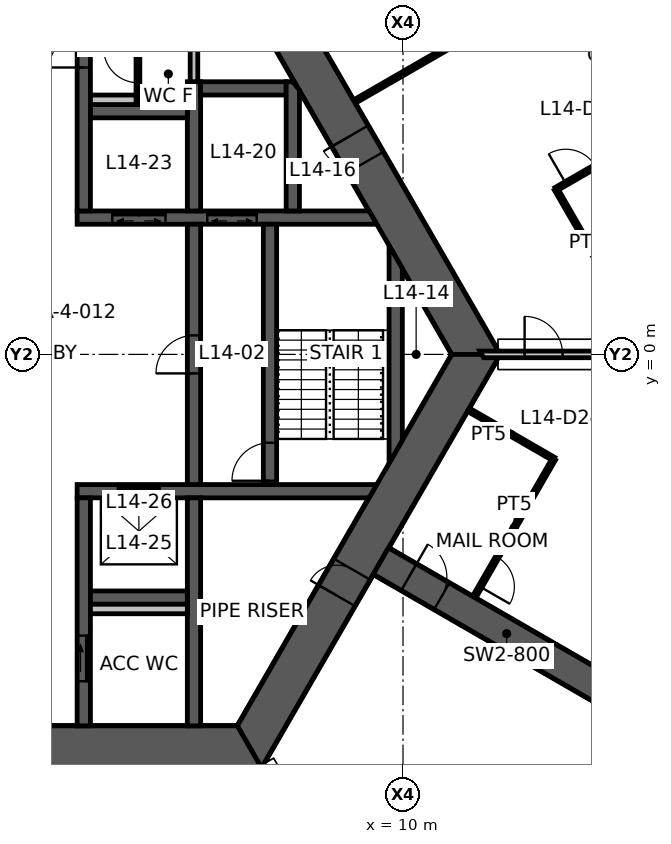
"""IFC4 building model, lengths in metres.
Left out: names, types, materials, properties, quantities, classifications, styles, units other than length and angle.
Written with IfcOpenShell. Run it as: python <this file> out.ifc"""

import sys

from ifc_helpers import new_model, si_unit, direction, frame, frame_2d, origin, place, context, subcontext, project, spatial, polyline, rectangle, outline, extrude, element, fill, save


model = new_model("IFC4")
c1 = context("Model", 3, precision=1e-05, world=origin(), true_north=direction((0.0, 1.0)))
c2 = subcontext(c1, "Body", "Model", "MODEL_VIEW")
j1 = project(units=[si_unit("LENGTHUNIT", "METRE"), si_unit("PLANEANGLEUNIT", "RADIAN")], contexts=[c1])
p1 = place(None, origin())
s1 = spatial("IfcSite", under=j1, at=p1, CompositionType="ELEMENT")
p2 = place(p1, origin())
s2 = spatial("IfcBuilding", under=s1, at=p2, CompositionType="ELEMENT")
p3 = place(p2, frame((0.0, 0.0, 57.0)))
s3 = spatial("IfcBuildingStorey", under=s2, at=p3, CompositionType="ELEMENT", Elevation=57.0)
p4 = place(p3, frame((11.922, 0.0, 0.0), z_axis=(0.0, 0.0, 1.0), x_axis=(-0.500004296715, 0.866022923061, 0.0)))
e1 = element("IfcWall", 1, at=p4, inside=s3, PredefinedType="SHEAR", context=c2, shape_type="SweptSolid", body=[
    extrude(outline(polyline([(-0.318, -0.55), (5.835, -0.55), (6.635, -0.55), (12.24, -0.55), (11.605, 0.55), (6.635, 0.55), (5.835, 0.55), (0.318, 0.55), (-0.318, -0.55)])), origin(), (0.0, 0.0, 1.0), 4.2),
])
p5 = place(p4, frame((5.835, 0.0, 0.0)))
e2 = element("IfcOpeningElement", 2, at=p5, cuts=e1, PredefinedType="OPENING", context=c2, shape_type="SweptSolid", body=[
    extrude(rectangle(XDim=0.8, YDim=2.1, at=frame_2d((0.4, 1.05))), frame((0.0, 0.56, 0.0), z_axis=(0.0, -1.0, 0.0), x_axis=(1.0, 0.0, 0.0)), (0.0, 0.0, 1.0), 1.12),
])
p6 = place(p3, frame((-5.961, -10.325, 0.0), z_axis=(0.0, 0.0, 1.0), x_axis=(1.0, 0.0, 0.0)))
e3 = element("IfcWall", 3, at=p6, inside=s3, PredefinedType="SHEAR", context=c2, shape_type="SweptSolid", body=[
    extrude(outline(polyline([(-0.318, -0.55), (5.461, -0.55), (6.461, -0.55), (12.24, -0.55), (11.605, 0.55), (6.461, 0.55), (5.461, 0.55), (0.318, 0.55), (-0.318, -0.55)])), origin(), (0.0, 0.0, 1.0), 4.2),
])
p7 = place(p6, frame((5.461, 0.0, 0.0)))
e4 = element("IfcOpeningElement", 4, at=p7, cuts=e3, PredefinedType="OPENING", context=c2, shape_type="SweptSolid", body=[
    extrude(rectangle(XDim=1.0, YDim=2.1, at=frame_2d((0.5, 1.05))), frame((0.0, 0.56, 0.0), z_axis=(0.0, -1.0, 0.0), x_axis=(1.0, 0.0, 0.0)), (0.0, 0.0, 1.0), 1.12),
])
p8 = place(p3, frame((5.961, -10.325, 0.0), z_axis=(0.0, 0.0, 1.0), x_axis=(0.500004296715, 0.866022923061, 0.0)))
e5 = element("IfcWall", 5, at=p8, inside=s3, PredefinedType="SHEAR", context=c2, shape_type="SweptSolid", body=[
    extrude(outline(polyline([(-0.318, -0.55), (4.594, -0.55), (5.394, -0.55), (12.24, -0.55), (11.605, 0.55), (5.394, 0.55), (4.594, 0.55), (0.318, 0.55), (-0.318, -0.55)])), origin(), (0.0, 0.0, 1.0), 4.2),
])
p9 = place(p8, frame((4.594, 0.0, 0.0)))
e6 = element("IfcOpeningElement", 6, at=p9, cuts=e5, PredefinedType="OPENING", context=c2, shape_type="SweptSolid", body=[
    extrude(rectangle(XDim=0.8, YDim=2.1, at=frame_2d((0.4, 1.05))), frame((0.0, 0.56, 0.0), z_axis=(0.0, -1.0, 0.0), x_axis=(1.0, 0.0, 0.0)), (0.0, 0.0, 1.0), 1.12),
])
p10 = place(p3, frame((9.418, -5.438, 0.0), z_axis=(0.0, 0.0, 1.0), x_axis=(0.866029782078, -0.499992416496, 0.0)))
e7 = element("IfcWall", 7, at=p10, inside=s3, PredefinedType="SHEAR", context=c2, shape_type="SweptSolid", body=[
    extrude(rectangle(XDim=7.646, YDim=0.8, at=frame_2d((3.823, 0.0))), origin(), (0.0, 0.0, 1.0), 4.2),
])
p11 = place(p10, frame((0.85, 0.0, 0.0)))
e8 = element("IfcOpeningElement", 8, at=p11, cuts=e7, PredefinedType="OPENING", context=c2, shape_type="SweptSolid", body=[
    extrude(rectangle(XDim=1.0, YDim=2.1, at=frame_2d((0.5, 1.05))), frame((0.0, 0.41, 0.0), z_axis=(0.0, -1.0, 0.0), x_axis=(1.0, 0.0, 0.0)), (0.0, 0.0, 1.0), 0.82),
])
p12 = place(p3, frame((1.425, 3.6, 0.0), z_axis=(0.0, 0.0, 1.0), x_axis=(1.0, 0.0, 0.0)))
e9 = element("IfcWall", 9, at=p12, inside=s3, PredefinedType="SHEAR", context=c2, shape_type="SweptSolid", body=[
    extrude(outline(polyline([(0.0, -0.175), (0.925, -0.175), (2.325, -0.175), (3.425, -0.175), (4.725, -0.175), (7.885, -0.175), (7.683, 0.175), (4.725, 0.175), (3.425, 0.175), (2.325, 0.175), (0.925, 0.175), (0.0, 0.175), (0.0, -0.175)])), origin(), (0.0, 0.0, 1.0), 4.2),
])
p13 = place(p12, frame((0.925, 0.0, 0.0)))
e10 = element("IfcOpeningElement", 10, at=p13, cuts=e9, PredefinedType="OPENING", context=c2, shape_type="SweptSolid", body=[
    extrude(rectangle(XDim=1.4, YDim=2.1, at=frame_2d((0.7, 1.05))), frame((0.0, 0.185, 0.0), z_axis=(0.0, -1.0, 0.0), x_axis=(1.0, 0.0, 0.0)), (0.0, 0.0, 1.0), 0.37),
])
p14 = place(p12, frame((3.425, 0.0, 0.0)))
e11 = element("IfcOpeningElement", 11, at=p14, cuts=e9, PredefinedType="OPENING", context=c2, shape_type="SweptSolid", body=[
    extrude(rectangle(XDim=1.3, YDim=2.1, at=frame_2d((0.65, 1.05))), frame((0.0, 0.185, 0.0), z_axis=(0.0, -1.0, 0.0), x_axis=(1.0, 0.0, 0.0)), (0.0, 0.0, 1.0), 0.37),
])
p15 = place(p3, frame((1.425, -3.6, 0.0), z_axis=(0.0, 0.0, 1.0), x_axis=(1.0, 0.0, 0.0)))
e12 = element("IfcWall", 12, at=p15, inside=s3, PredefinedType="SHEAR", context=c2, shape_type="SweptSolid", body=[
    extrude(outline(polyline([(0.0, -0.175), (1.075, -0.175), (2.175, -0.175), (7.683, -0.175), (7.885, 0.175), (2.175, 0.175), (1.075, 0.175), (0.0, 0.175), (0.0, -0.175)])), origin(), (0.0, 0.0, 1.0), 4.2),
])
p16 = place(p15, frame((1.075, 0.0, 0.0)))
e13 = element("IfcOpeningElement", 13, at=p16, cuts=e12, PredefinedType="OPENING", context=c2, shape_type="SweptSolid", body=[
    extrude(rectangle(XDim=1.1, YDim=2.1, at=frame_2d((0.55, 1.05))), frame((0.0, 0.185, 0.0), z_axis=(0.0, -1.0, 0.0), x_axis=(1.0, 0.0, 0.0)), (0.0, 0.0, 1.0), 0.37),
])
p17 = place(p3, frame((1.6, 3.775, 0.0), z_axis=(0.0, 0.0, 1.0), x_axis=(0.0, 1.0, 0.0)))
e14 = element("IfcWall", 14, at=p17, inside=s3, PredefinedType="SHEAR", context=c2, shape_type="SweptSolid", body=[
    extrude(rectangle(XDim=6.0, YDim=0.35, at=frame_2d((3.0, 0.0))), origin(), (0.0, 0.0, 1.0), 4.2),
])
p18 = place(p17, frame((3.775, 0.0, 0.0)))
e15 = element("IfcOpeningElement", 15, at=p18, cuts=e14, PredefinedType="OPENING", context=c2, shape_type="SweptSolid", body=[
    extrude(rectangle(XDim=0.9, YDim=2.1, at=frame_2d((0.45, 1.05))), frame((0.0, 0.185, 0.0), z_axis=(0.0, -1.0, 0.0), x_axis=(1.0, 0.0, 0.0)), (0.0, 0.0, 1.0), 0.37),
])
p19 = place(p3, frame((1.6, -3.775, 0.0), z_axis=(0.0, 0.0, 1.0), x_axis=(0.0, -1.0, 0.0)))
e16 = element("IfcWall", 16, at=p19, inside=s3, PredefinedType="SHEAR", context=c2, shape_type="SweptSolid", body=[
    extrude(rectangle(XDim=6.0, YDim=0.35, at=frame_2d((3.0, 0.0))), origin(), (0.0, 0.0, 1.0), 4.2),
])
p20 = place(p19, frame((3.625, 0.0, 0.0)))
e17 = element("IfcOpeningElement", 17, at=p20, cuts=e16, PredefinedType="OPENING", context=c2, shape_type="SweptSolid", body=[
    extrude(rectangle(XDim=1.2, YDim=2.1, at=frame_2d((0.6, 1.05))), frame((0.0, 0.185, 0.0), z_axis=(0.0, -1.0, 0.0), x_axis=(1.0, 0.0, 0.0)), (0.0, 0.0, 1.0), 0.37),
])
p21 = place(p3, frame((4.5, -3.425, 0.0), z_axis=(0.0, 0.0, 1.0), x_axis=(0.0, 1.0, 0.0)))
e18 = element("IfcWall", 18, at=p21, inside=s3, PredefinedType="SHEAR", context=c2, shape_type="SweptSolid", body=[
    extrude(rectangle(XDim=6.85, YDim=0.35, at=frame_2d((3.425, 0.0))), origin(), (0.0, 0.0, 1.0), 4.2),
])
p22 = place(p21, frame((2.925, 0.0, 0.0)))
e19 = element("IfcOpeningElement", 19, at=p22, cuts=e18, PredefinedType="OPENING", context=c2, shape_type="SweptSolid", body=[
    extrude(rectangle(XDim=1.0, YDim=2.1, at=frame_2d((0.5, 1.05))), frame((0.0, 0.185, 0.0), z_axis=(0.0, -1.0, 0.0), x_axis=(1.0, 0.0, 0.0)), (0.0, 0.0, 1.0), 0.37),
])
p23 = place(p3, frame((6.5, -3.425, 0.0), z_axis=(0.0, 0.0, 1.0), x_axis=(0.0, 1.0, 0.0)))
e20 = element("IfcWall", 20, at=p23, inside=s3, PredefinedType="SHEAR", context=c2, shape_type="SweptSolid", body=[
    extrude(rectangle(XDim=6.85, YDim=0.35, at=frame_2d((3.425, 0.0))), origin(), (0.0, 0.0, 1.0), 4.2),
])
p24 = place(p23, frame((0.1, 0.0, 0.0)))
e21 = element("IfcOpeningElement", 21, at=p24, cuts=e20, PredefinedType="OPENING", context=c2, shape_type="SweptSolid", body=[
    extrude(rectangle(XDim=1.0, YDim=2.1, at=frame_2d((0.5, 1.05))), frame((0.0, 0.185, 0.0), z_axis=(0.0, -1.0, 0.0), x_axis=(1.0, 0.0, 0.0)), (0.0, 0.0, 1.0), 0.37),
])
p25 = place(p3, frame((4.5, 3.775, 0.0), z_axis=(0.0, 0.0, 1.0), x_axis=(0.0, 1.0, 0.0)))
e22 = element("IfcWall", 22, at=p25, inside=s3, PredefinedType="SHEAR", context=c2, shape_type="SweptSolid", body=[
    extrude(rectangle(XDim=3.4, YDim=0.35, at=frame_2d((1.7, 0.0))), origin(), (0.0, 0.0, 1.0), 4.2),
])
p26 = place(p3, frame((4.5, -3.775, 0.0), z_axis=(0.0, 0.0, 1.0), x_axis=(0.0, -1.0, 0.0)))
e23 = element("IfcWall", 23, at=p26, inside=s3, PredefinedType="SHEAR", context=c2, shape_type="SweptSolid", body=[
    extrude(rectangle(XDim=6.0, YDim=0.35, at=frame_2d((3.0, 0.0))), origin(), (0.0, 0.0, 1.0), 4.2),
])
for number, where, z_axis, x_axis in (
    (24, (1.775, 6.4, 0.0), (0.0, 0.0, 1.0), (1.0, 0.0, 0.0)),
    (25, (1.775, -6.4, 0.0), (0.0, 0.0, 1.0), (1.0, 0.0, 0.0)),
):
    element("IfcWall", number, at=place(p3, frame(where, z_axis=z_axis, x_axis=x_axis)), inside=s3, PredefinedType="SHEAR", context=c2, shape_type="SweptSolid", body=[
        extrude(rectangle(XDim=2.55, YDim=0.35, at=frame_2d((1.275, 0.0))), origin(), (0.0, 0.0, 1.0), 4.2),
    ])
p27 = place(p3, frame((4.675, 7.0, 0.0), z_axis=(0.0, 0.0, 1.0), x_axis=(1.0, 0.0, 0.0)))
e26 = element("IfcWall", 26, at=p27, inside=s3, PredefinedType="SHEAR", context=c2, shape_type="SweptSolid", body=[
    extrude(rectangle(XDim=2.25, YDim=0.35, at=frame_2d((1.125, 0.0))), origin(), (0.0, 0.0, 1.0), 4.2),
])
p28 = place(p3, frame((7.1, 3.775, 0.0), z_axis=(0.0, 0.0, 1.0), x_axis=(0.0, 1.0, 0.0)))
e27 = element("IfcWall", 27, at=p28, inside=s3, PredefinedType="SHEAR", context=c2, shape_type="SweptSolid", body=[
    extrude(outline(polyline([(0.0, -0.175), (3.175, -0.175), (3.4, 0.0), (3.4, 0.175), (0.0, 0.175), (0.0, -0.175)])), origin(), (0.0, 0.0, 1.0), 4.2),
])
p29 = place(p3, frame((9.808, -2.562, 0.0), z_axis=(0.0, 0.0, 1.0), x_axis=(0.0, 1.0, 0.0)))
e28 = element("IfcWall", 28, at=p29, inside=s3, PredefinedType="SHEAR", context=c2, shape_type="SweptSolid", body=[
    extrude(outline(polyline([(0.303, -0.175), (4.821, -0.175), (5.428, 0.175), (-0.303, 0.175), (0.303, -0.175)])), origin(), (0.0, 0.0, 1.0), 4.2),
])
p30 = place(p3, frame((4.5, 7.175, 0.0), z_axis=(0.0, 0.0, 1.0), x_axis=(0.0, 1.0, 0.0)))
e29 = element("IfcWall", 29, at=p30, inside=s3, PredefinedType="STANDARD", context=c2, shape_type="SweptSolid", body=[
    extrude(rectangle(XDim=2.6, YDim=0.2, at=frame_2d((1.3, 0.0))), origin(), (0.0, 0.0, 1.0), 4.2),
])
for number, where, z_axis, x_axis in (
    (30, (1.775, 6.7, 0.0), (0.0, 0.0, 1.0), (1.0, 0.0, 0.0)),
    (31, (1.775, -6.7, 0.0), (0.0, 0.0, 1.0), (1.0, 0.0, 0.0)),
):
    element("IfcWall", number, at=place(p3, frame(where, z_axis=z_axis, x_axis=x_axis)), inside=s3, PredefinedType="PLUMBINGWALL", context=c2, shape_type="SweptSolid", body=[
        extrude(rectangle(XDim=2.55, YDim=0.25, at=frame_2d((1.275, 0.0))), origin(), (0.0, 0.0, 1.0), 4.2),
    ])
p31 = place(p3, frame((3.025, 6.575, 0.0), z_axis=(0.0, 0.0, 1.0), x_axis=(0.0, 1.0, 0.0)))
e32 = element("IfcWall", 32, at=p31, inside=s3, PredefinedType="PARTITIONING", context=c2, shape_type="SweptSolid", body=[
    extrude(rectangle(XDim=3.2, YDim=0.1, at=frame_2d((1.6, 0.0))), origin(), (0.0, 0.0, 1.0), 3.25),
])
p32 = place(p31, frame((0.575, 0.0, 0.0)))
e33 = element("IfcOpeningElement", 33, at=p32, cuts=e32, PredefinedType="OPENING", context=c2, shape_type="SweptSolid", body=[
    extrude(rectangle(XDim=0.9, YDim=2.1, at=frame_2d((0.45, 1.05))), frame((0.0, 0.06, 0.0), z_axis=(0.0, -1.0, 0.0), x_axis=(1.0, 0.0, 0.0)), (0.0, 0.0, 1.0), 0.12),
])
p33 = place(p31, frame((2.1, 0.0, 0.0)))
e34 = element("IfcOpeningElement", 34, at=p33, cuts=e32, PredefinedType="OPENING", context=c2, shape_type="SweptSolid", body=[
    extrude(rectangle(XDim=0.9, YDim=2.1, at=frame_2d((0.45, 1.05))), frame((0.0, 0.06, 0.0), z_axis=(0.0, -1.0, 0.0), x_axis=(1.0, 0.0, 0.0)), (0.0, 0.0, 1.0), 0.12),
])
p34 = place(p3, frame((12.072, 0.0, 0.0), z_axis=(0.0, 0.0, 1.0), x_axis=(1.0, 0.0, 0.0)))
e35 = element("IfcWall", 35, at=p34, inside=s3, PredefinedType="PARTITIONING", context=c2, shape_type="SweptSolid", body=[
    extrude(outline(polyline([(0.051, -0.087), (1.127, -0.087), (2.127, -0.087), (7.928, -0.087), (7.928, 0.087), (2.127, 0.087), (1.127, 0.087), (-0.051, 0.087), (0.051, -0.087)])), origin(), (0.0, 0.0, 1.0), 3.35),
])
p35 = place(p34, frame((1.127, 0.0, 0.0)))
e36 = element("IfcOpeningElement", 36, at=p35, cuts=e35, PredefinedType="OPENING", context=c2, shape_type="SweptSolid", body=[
    extrude(rectangle(XDim=1.0, YDim=2.1, at=frame_2d((0.5, 1.05))), frame((0.0, 0.098, 0.0), z_axis=(0.0, -1.0, 0.0), x_axis=(1.0, 0.0, 0.0)), (0.0, 0.0, 1.0), 0.195),
])
p36 = place(p3, frame((11.143, 8.05, 0.0), z_axis=(0.0, 0.0, 1.0), x_axis=(-0.86603494908, -0.499983466698, 0.0)))
e37 = element("IfcWall", 37, at=p36, inside=s3, PredefinedType="PARTITIONING", context=c2, shape_type="SweptSolid", body=[
    extrude(rectangle(XDim=2.78, YDim=0.1, at=frame_2d((1.39, 0.0))), origin(), (0.0, 0.0, 1.0), 3.25),
])
p37 = place(p3, frame((14.025, 4.349, 0.0), z_axis=(0.0, 0.0, 1.0), x_axis=(0.866043818878, 0.499968102766, 0.0)))
e38 = element("IfcWall", 38, at=p37, inside=s3, PredefinedType="PARTITIONING", context=c2, shape_type="SweptSolid", body=[
    extrude(rectangle(XDim=3.47, YDim=0.1, at=frame_2d((1.735, 0.0))), origin(), (0.0, 0.0, 1.0), 3.25),
])
p38 = place(p37, frame((0.3, 0.0, 0.0)))
e39 = element("IfcOpeningElement", 39, at=p38, cuts=e38, PredefinedType="OPENING", context=c2, shape_type="SweptSolid", body=[
    extrude(rectangle(XDim=0.9, YDim=2.1, at=frame_2d((0.45, 1.05))), frame((0.0, 0.06, 0.0), z_axis=(0.0, -1.0, 0.0), x_axis=(1.0, 0.0, 0.0)), (0.0, 0.0, 1.0), 0.12),
])
p39 = place(p3, frame((15.648, 1.537, 0.0), z_axis=(0.0, 0.0, 1.0), x_axis=(-0.499956811548, 0.866050337213, 0.0)))
e40 = element("IfcWall", 40, at=p39, inside=s3, PredefinedType="PARTITIONING", context=c2, shape_type="SweptSolid", body=[
    extrude(rectangle(XDim=3.246, YDim=0.1, at=frame_2d((1.623, 0.0))), origin(), (0.0, 0.0, 1.0), 3.25),
])
p40 = place(p3, frame((11.735, -1.464, 0.0), z_axis=(0.0, 0.0, 1.0), x_axis=(0.866021702275, -0.500006411147, 0.0)))
e41 = element("IfcWall", 41, at=p40, inside=s3, PredefinedType="PARTITIONING", context=c2, shape_type="SweptSolid", body=[
    extrude(rectangle(XDim=2.58, YDim=0.1, at=frame_2d((1.29, 0.0))), origin(), (0.0, 0.0, 1.0), 3.25),
])
p41 = place(p3, frame((13.97, -2.754, 0.0), z_axis=(0.0, 0.0, 1.0), x_axis=(-0.499801669165, -0.866139879869, 0.0)))
e42 = element("IfcWall", 42, at=p41, inside=s3, PredefinedType="PARTITIONING", context=c2, shape_type="SweptSolid", body=[
    extrude(rectangle(XDim=4.18, YDim=0.1, at=frame_2d((2.09, 0.0))), origin(), (0.0, 0.0, 1.0), 3.25),
])
p42 = place(p41, frame((2.98, 0.0, 0.0)))
e43 = element("IfcOpeningElement", 43, at=p42, cuts=e42, PredefinedType="OPENING", context=c2, shape_type="SweptSolid", body=[
    extrude(rectangle(XDim=0.9, YDim=2.1, at=frame_2d((0.45, 1.05))), frame((0.0, 0.06, 0.0), z_axis=(0.0, -1.0, 0.0), x_axis=(1.0, 0.0, 0.0)), (0.0, 0.0, 1.0), 0.12),
])
p43 = place(p5, origin())
e44 = element("IfcDoor", 44, at=p43, inside=s3, OperationType="SINGLE_SWING_RIGHT", PredefinedType="DOOR", context=c2, shape_type="SweptSolid", body=[
    extrude(rectangle(XDim=0.8, YDim=2.1, at=frame_2d((0.4, 1.05))), frame((0.0, 0.025, 0.0), z_axis=(0.0, -1.0, 0.0), x_axis=(1.0, 0.0, 0.0)), (0.0, 0.0, 1.0), 0.05),
])
fill(e2, e44)
p44 = place(p9, origin())
e45 = element("IfcDoor", 45, at=p44, inside=s3, OperationType="SINGLE_SWING_LEFT", PredefinedType="DOOR", context=c2, shape_type="SweptSolid", body=[
    extrude(rectangle(XDim=0.8, YDim=2.1, at=frame_2d((0.4, 1.05))), frame((0.0, 0.025, 0.0), z_axis=(0.0, -1.0, 0.0), x_axis=(1.0, 0.0, 0.0)), (0.0, 0.0, 1.0), 0.05),
])
fill(e6, e45)
p45 = place(p22, origin())
e46 = element("IfcDoor", 46, at=p45, inside=s3, OperationType="SINGLE_SWING_LEFT", PredefinedType="DOOR", context=c2, shape_type="SweptSolid", body=[
    extrude(rectangle(XDim=1.0, YDim=2.1, at=frame_2d((0.5, 1.05))), frame((0.0, 0.025, 0.0), z_axis=(0.0, -1.0, 0.0), x_axis=(1.0, 0.0, 0.0)), (0.0, 0.0, 1.0), 0.05),
])
fill(e19, e46)
p46 = place(p24, origin())
e47 = element("IfcDoor", 47, at=p46, inside=s3, OperationType="SINGLE_SWING_LEFT", PredefinedType="DOOR", context=c2, shape_type="SweptSolid", body=[
    extrude(rectangle(XDim=1.0, YDim=2.1, at=frame_2d((0.5, 1.05))), frame((0.0, 0.025, 0.0), z_axis=(0.0, -1.0, 0.0), x_axis=(1.0, 0.0, 0.0)), (0.0, 0.0, 1.0), 0.05),
])
fill(e21, e47)
p47 = place(p18, origin())
e48 = element("IfcDoor", 48, at=p47, inside=s3, OperationType="SINGLE_SWING_LEFT", PredefinedType="DOOR", context=c2, shape_type="SweptSolid", body=[
    extrude(rectangle(XDim=0.9, YDim=2.1, at=frame_2d((0.45, 1.05))), frame((0.0, 0.025, 0.0), z_axis=(0.0, -1.0, 0.0), x_axis=(1.0, 0.0, 0.0)), (0.0, 0.0, 1.0), 0.05),
])
fill(e15, e48)
p48 = place(p20, origin())
e49 = element("IfcDoor", 49, at=p48, inside=s3, OperationType="SLIDING_TO_LEFT", PredefinedType="DOOR", context=c2, shape_type="SweptSolid", body=[
    extrude(rectangle(XDim=1.2, YDim=2.1, at=frame_2d((0.6, 1.05))), frame((0.0, 0.025, 0.0), z_axis=(0.0, -1.0, 0.0), x_axis=(1.0, 0.0, 0.0)), (0.0, 0.0, 1.0), 0.05),
])
fill(e17, e49)
p49 = place(p11, origin())
e50 = element("IfcDoor", 50, at=p49, inside=s3, OperationType="SINGLE_SWING_LEFT", PredefinedType="DOOR", context=c2, shape_type="SweptSolid", body=[
    extrude(rectangle(XDim=1.0, YDim=2.1, at=frame_2d((0.5, 1.05))), frame((0.0, 0.025, 0.0), z_axis=(0.0, -1.0, 0.0), x_axis=(1.0, 0.0, 0.0)), (0.0, 0.0, 1.0), 0.05),
])
fill(e8, e50)
p50 = place(p32, origin())
e51 = element("IfcDoor", 51, at=p50, inside=s3, OperationType="SINGLE_SWING_RIGHT", PredefinedType="DOOR", context=c2, shape_type="SweptSolid", body=[
    extrude(rectangle(XDim=0.9, YDim=2.1, at=frame_2d((0.45, 1.05))), frame((0.0, 0.025, 0.0), z_axis=(0.0, -1.0, 0.0), x_axis=(1.0, 0.0, 0.0)), (0.0, 0.0, 1.0), 0.05),
])
fill(e33, e51)
p51 = place(p35, origin())
e52 = element("IfcDoor", 52, at=p51, inside=s3, OperationType="SINGLE_SWING_LEFT", PredefinedType="DOOR", context=c2, shape_type="SweptSolid", body=[
    extrude(rectangle(XDim=1.0, YDim=2.1, at=frame_2d((0.5, 1.05))), frame((0.0, 0.025, 0.0), z_axis=(0.0, -1.0, 0.0), x_axis=(1.0, 0.0, 0.0)), (0.0, 0.0, 1.0), 0.05),
])
fill(e36, e52)
p52 = place(p38, origin())
e53 = element("IfcDoor", 53, at=p52, inside=s3, OperationType="SINGLE_SWING_LEFT", PredefinedType="DOOR", context=c2, shape_type="SweptSolid", body=[
    extrude(rectangle(XDim=0.9, YDim=2.1, at=frame_2d((0.45, 1.05))), frame((0.0, 0.025, 0.0), z_axis=(0.0, -1.0, 0.0), x_axis=(1.0, 0.0, 0.0)), (0.0, 0.0, 1.0), 0.05),
])
fill(e39, e53)
p53 = place(p42, origin())
e54 = element("IfcDoor", 54, at=p53, inside=s3, OperationType="SINGLE_SWING_RIGHT", PredefinedType="DOOR", context=c2, shape_type="SweptSolid", body=[
    extrude(rectangle(XDim=0.9, YDim=2.1, at=frame_2d((0.45, 1.05))), frame((0.0, 0.025, 0.0), z_axis=(0.0, -1.0, 0.0), x_axis=(1.0, 0.0, 0.0)), (0.0, 0.0, 1.0), 0.05),
])
fill(e43, e54)
p54 = place(p16, origin())
e55 = element("IfcDoor", 55, at=p54, inside=s3, OperationType="DOUBLE_DOOR_SLIDING", PredefinedType="DOOR", context=c2, shape_type="SweptSolid", body=[
    extrude(rectangle(XDim=1.1, YDim=2.1, at=frame_2d((0.55, 1.05))), frame((0.0, 0.025, 0.0), z_axis=(0.0, -1.0, 0.0), x_axis=(1.0, 0.0, 0.0)), (0.0, 0.0, 1.0), 0.05),
])
fill(e13, e55)
p55 = place(p13, origin())
e56 = element("IfcDoor", 56, at=p55, inside=s3, OperationType="DOUBLE_DOOR_SLIDING", PredefinedType="DOOR", context=c2, shape_type="SweptSolid", body=[
    extrude(rectangle(XDim=1.4, YDim=2.1, at=frame_2d((0.7, 1.05))), frame((0.0, 0.025, 0.0), z_axis=(0.0, -1.0, 0.0), x_axis=(1.0, 0.0, 0.0)), (0.0, 0.0, 1.0), 0.05),
])
fill(e10, e56)
p56 = place(p14, origin())
e57 = element("IfcDoor", 57, at=p56, inside=s3, OperationType="DOUBLE_DOOR_SLIDING", PredefinedType="DOOR", context=c2, shape_type="SweptSolid", body=[
    extrude(rectangle(XDim=1.3, YDim=2.1, at=frame_2d((0.65, 1.05))), frame((0.0, 0.025, 0.0), z_axis=(0.0, -1.0, 0.0), x_axis=(1.0, 0.0, 0.0)), (0.0, 0.0, 1.0), 0.05),
])
fill(e11, e57)
save(model, sys.argv[1])
